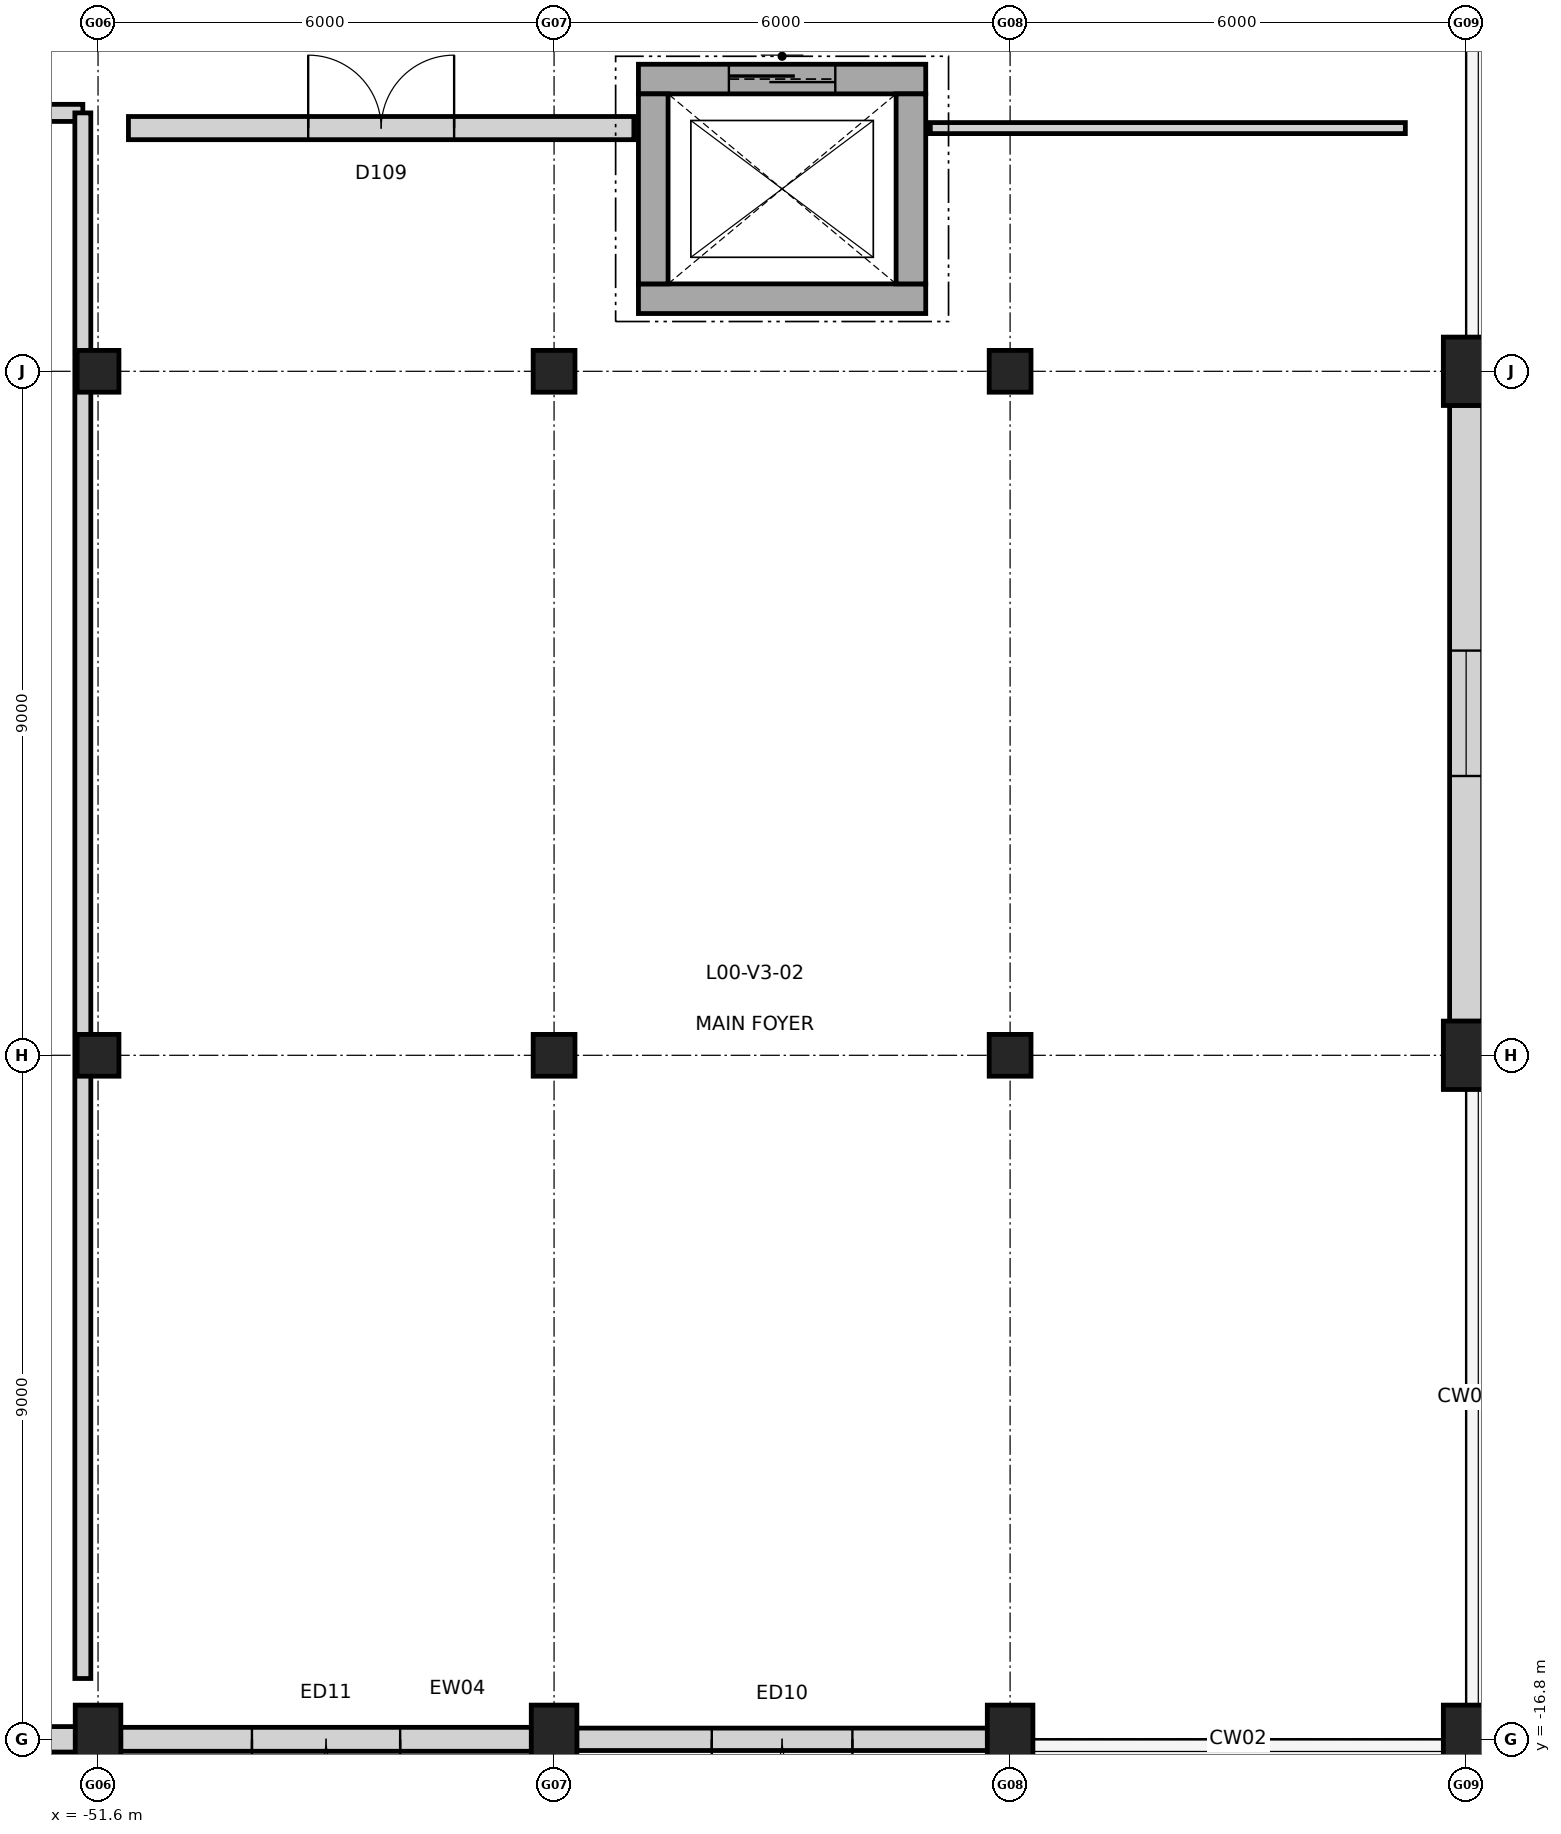
"""IFC4 building model, lengths in metres.
Left out: names, types, materials, properties, quantities, classifications, styles, units other than length and angle.
Written with IfcOpenShell. Run it as: python <this file> out.ifc"""

import sys

from ifc_helpers import new_model, si_unit, direction, frame, frame_2d, origin, origin_2d, place, context, subcontext, project, spatial, rectangle, extrude, element, fill, save


model = new_model("IFC4")
c1 = context("Model", 3, precision=1e-05, world=origin(), true_north=direction((0.0, 1.0)))
c2 = subcontext(c1, "Body", "Model", "MODEL_VIEW")
j1 = project(units=[si_unit("LENGTHUNIT", "METRE"), si_unit("PLANEANGLEUNIT", "RADIAN")], contexts=[c1])
p1 = place(None, origin())
s1 = spatial("IfcSite", under=j1, at=p1, CompositionType="ELEMENT")
p2 = place(p1, origin())
s2 = spatial("IfcBuilding", under=s1, at=p2, CompositionType="ELEMENT")
p3 = place(p2, origin())
s3 = spatial("IfcBuildingStorey", under=s2, at=p3, CompositionType="ELEMENT", Elevation=0.0)
p4 = place(p3, frame((-51.6, -16.8, 0.0), z_axis=(0.0, 0.0, 1.0), x_axis=(1.0, 0.0, 0.0)))
e1 = element("IfcColumn", 1, at=p4, inside=s3, PredefinedType="COLUMN", context=c2, shape_type="SweptSolid", body=[
    extrude(rectangle(XDim=0.6, YDim=0.9, at=origin_2d()), origin(), (0.0, 0.0, 1.0), 5.4),
])
for number, where, z_axis, x_axis in (
    (2, (-51.6, -7.8, 0.0), (0.0, 0.0, 1.0), (1.0, 0.0, 0.0)),
    (3, (-51.6, 1.2, 0.0), (0.0, 0.0, 1.0), (1.0, 0.0, 0.0)),
):
    element("IfcColumn", number, at=place(p3, frame(where, z_axis=z_axis, x_axis=x_axis)), inside=s3, PredefinedType="COLUMN", context=c2, shape_type="SweptSolid", body=[
        extrude(rectangle(XDim=0.55, YDim=0.55, at=origin_2d()), origin(), (0.0, 0.0, 1.0), 5.4),
    ])
p5 = place(p3, frame((-45.6, -16.8, 0.0), z_axis=(0.0, 0.0, 1.0), x_axis=(1.0, 0.0, 0.0)))
e4 = element("IfcColumn", 4, at=p5, inside=s3, PredefinedType="COLUMN", context=c2, shape_type="SweptSolid", body=[
    extrude(rectangle(XDim=0.6, YDim=0.9, at=origin_2d()), origin(), (0.0, 0.0, 1.0), 5.4),
])
for number, where, z_axis, x_axis in (
    (5, (-45.6, -7.8, 0.0), (0.0, 0.0, 1.0), (1.0, 0.0, 0.0)),
    (6, (-45.6, 1.2, 0.0), (0.0, 0.0, 1.0), (1.0, 0.0, 0.0)),
):
    element("IfcColumn", number, at=place(p3, frame(where, z_axis=z_axis, x_axis=x_axis)), inside=s3, PredefinedType="COLUMN", context=c2, shape_type="SweptSolid", body=[
        extrude(rectangle(XDim=0.55, YDim=0.55, at=origin_2d()), origin(), (0.0, 0.0, 1.0), 5.4),
    ])
p6 = place(p3, frame((-39.6, -16.8, 0.0), z_axis=(0.0, 0.0, 1.0), x_axis=(1.0, 0.0, 0.0)))
e7 = element("IfcColumn", 7, at=p6, inside=s3, PredefinedType="COLUMN", context=c2, shape_type="SweptSolid", body=[
    extrude(rectangle(XDim=0.6, YDim=0.9, at=origin_2d()), origin(), (0.0, 0.0, 1.0), 5.4),
])
for number, where, z_axis, x_axis in (
    (8, (-39.6, -7.8, 0.0), (0.0, 0.0, 1.0), (1.0, 0.0, 0.0)),
    (9, (-39.6, 1.2, 0.0), (0.0, 0.0, 1.0), (1.0, 0.0, 0.0)),
):
    element("IfcColumn", number, at=place(p3, frame(where, z_axis=z_axis, x_axis=x_axis)), inside=s3, PredefinedType="COLUMN", context=c2, shape_type="SweptSolid", body=[
        extrude(rectangle(XDim=0.55, YDim=0.55, at=origin_2d()), origin(), (0.0, 0.0, 1.0), 5.4),
    ])
for number, where, z_axis, x_axis in (
    (10, (-33.6, -16.8, 0.0), (0.0, 0.0, 1.0), (1.0, 0.0, 0.0)),
    (11, (-33.6, -7.8, 0.0), (0.0, 0.0, 1.0), (1.0, 0.0, 0.0)),
    (12, (-33.6, 1.2, 0.0), (0.0, 0.0, 1.0), (1.0, 0.0, 0.0)),
):
    element("IfcColumn", number, at=place(p3, frame(where, z_axis=z_axis, x_axis=x_axis)), inside=s3, PredefinedType="COLUMN", context=c2, shape_type="SweptSolid", body=[
        extrude(rectangle(XDim=0.6, YDim=0.9, at=origin_2d()), origin(), (0.0, 0.0, 1.0), 5.4),
    ])
p7 = place(p3, frame((-39.898, -16.8, 0.0), z_axis=(0.0, 0.0, 1.0), x_axis=(-1.0, 0.0, 0.0)))
e13 = element("IfcWall", 13, at=p7, inside=s3, PredefinedType="STANDARD", context=c2, shape_type="SweptSolid", body=[
    extrude(rectangle(XDim=5.404, YDim=0.295, at=frame_2d((2.702, 0.0))), origin(), (0.0, 0.0, 1.0), 4.32),
])
p8 = place(p7, frame((1.777, 0.0, 0.0)))
e14 = element("IfcOpeningElement", 14, at=p8, cuts=e13, PredefinedType="OPENING", context=c2, shape_type="SweptSolid", body=[
    extrude(rectangle(XDim=1.85, YDim=2.25, at=frame_2d((0.925, 1.125))), frame((0.0, 0.157, 0.0), z_axis=(0.0, -1.0, 0.0), x_axis=(1.0, 0.0, 0.0)), (0.0, 0.0, 1.0), 0.315),
])
p9 = place(p3, frame((-45.898, -16.8, 0.0), z_axis=(0.0, 0.0, 1.0), x_axis=(-1.0, 0.0, 0.0)))
e15 = element("IfcWall", 15, at=p9, inside=s3, PredefinedType="STANDARD", context=c2, shape_type="SweptSolid", body=[
    extrude(rectangle(XDim=5.404, YDim=0.315, at=frame_2d((2.702, 0.0))), origin(), (0.0, 0.0, 1.0), 4.32),
])
p10 = place(p9, frame((1.727, 0.0, 0.0)))
e16 = element("IfcOpeningElement", 16, at=p10, cuts=e15, PredefinedType="OPENING", context=c2, shape_type="SweptSolid", body=[
    extrude(rectangle(XDim=1.95, YDim=2.35, at=frame_2d((0.975, 1.175))), frame((0.0, 0.167, 0.0), z_axis=(0.0, -1.0, 0.0), x_axis=(1.0, 0.0, 0.0)), (0.0, 0.0, 1.0), 0.335),
])
p11 = place(p3, frame((-51.898, -16.8, 0.0), z_axis=(0.0, 0.0, 1.0), x_axis=(-1.0, 0.0, 0.0)))
e17 = element("IfcWall", 17, at=p11, inside=s3, PredefinedType="STANDARD", context=c2, shape_type="SweptSolid", body=[
    extrude(rectangle(XDim=5.404, YDim=0.335, at=frame_2d((2.702, 0.0))), origin(), (0.0, 0.0, 1.0), 4.32),
])
p12 = place(p11, frame((1.502, 0.0, 0.0)))
e18 = element("IfcOpeningElement", 18, at=p12, cuts=e17, PredefinedType="OPENING", context=c2, shape_type="SweptSolid", body=[
    extrude(rectangle(XDim=2.4, YDim=2.5, at=frame_2d((1.2, 1.25))), frame((0.0, 0.177, 0.0), z_axis=(0.0, -1.0, 0.0), x_axis=(1.0, 0.0, 0.0)), (0.0, 0.0, 1.0), 0.355),
])
p13 = place(p3, frame((-33.6, 0.752, 0.0), z_axis=(0.0, 0.0, 1.0), x_axis=(0.0, -1.0, 0.0)))
e19 = element("IfcWall", 19, at=p13, inside=s3, PredefinedType="STANDARD", context=c2, shape_type="SweptSolid", body=[
    extrude(rectangle(XDim=8.104, YDim=0.435, at=frame_2d((4.052, 0.0))), origin(), (0.0, 0.0, 1.0), 4.404),
])
p14 = place(p13, frame((3.227, 0.0, 0.85)))
e20 = element("IfcOpeningElement", 20, at=p14, cuts=e19, PredefinedType="OPENING", context=c2, shape_type="SweptSolid", body=[
    extrude(rectangle(XDim=1.65, YDim=2.1, at=frame_2d((0.825, 1.05))), frame((0.0, 0.228, 0.0), z_axis=(0.0, -1.0, 0.0), x_axis=(1.0, 0.0, 0.0)), (0.0, 0.0, 1.0), 0.455),
])
p15 = place(p3, frame((-40.71, 2.155, 0.0), z_axis=(0.0, 0.0, 1.0), x_axis=(-1.0, 0.0, 0.0)))
e21 = element("IfcWall", 21, at=p15, inside=s3, PredefinedType="SHEAR", context=c2, shape_type="SweptSolid", body=[
    extrude(rectangle(XDim=3.78, YDim=0.39, at=frame_2d((1.89, 0.0))), origin(), (0.0, 0.0, 1.0), 5.4),
])
p16 = place(p3, frame((-44.49, 5.045, 0.0), z_axis=(0.0, 0.0, 1.0), x_axis=(1.0, 0.0, 0.0)))
e22 = element("IfcWall", 22, at=p16, inside=s3, PredefinedType="SHEAR", context=c2, shape_type="SweptSolid", body=[
    extrude(rectangle(XDim=3.78, YDim=0.39, at=frame_2d((1.89, 0.0))), origin(), (0.0, 0.0, 1.0), 5.4),
])
p17 = place(p16, frame((1.19, 0.0, 0.0)))
e23 = element("IfcOpeningElement", 23, at=p17, cuts=e22, PredefinedType="OPENING", context=c2, shape_type="SweptSolid", body=[
    extrude(rectangle(XDim=1.4, YDim=2.2, at=frame_2d((0.7, 1.1))), frame((0.0, 0.205, 0.0), z_axis=(0.0, -1.0, 0.0), x_axis=(1.0, 0.0, 0.0)), (0.0, 0.0, 1.0), 0.41),
])
for number, where, z_axis, x_axis in (
    (24, (-44.295, 2.35, 0.0), (0.0, 0.0, 1.0), (0.0, 1.0, 0.0)),
    (25, (-40.905, 4.85, 0.0), (0.0, 0.0, 1.0), (0.0, -1.0, 0.0)),
):
    element("IfcWall", number, at=place(p3, frame(where, z_axis=z_axis, x_axis=x_axis)), inside=s3, PredefinedType="SHEAR", context=c2, shape_type="SweptSolid", body=[
        extrude(rectangle(XDim=2.5, YDim=0.39, at=frame_2d((1.25, 0.0))), origin(), (0.0, 0.0, 1.0), 5.4),
    ])
p18 = place(p3, frame((-74.8, 4.6, 0.0), z_axis=(0.0, 0.0, 1.0), x_axis=(1.0, 0.0, 0.0)))
e26 = element("IfcWall", 26, at=p18, inside=s3, PredefinedType="PARTITIONING", context=c2, shape_type="SweptSolid", body=[
    extrude(rectangle(XDim=23.0, YDim=0.225, at=frame_2d((11.5, 0.0))), origin(), (0.0, 0.0, 1.0), 5.02),
])
p19 = place(p18, frame((10.61, 0.0, 0.0)))
e27 = element("IfcOpeningElement", 27, at=p19, cuts=e26, PredefinedType="OPENING", context=c2, shape_type="SweptSolid", body=[
    extrude(rectangle(XDim=1.78, YDim=2.3, at=frame_2d((0.89, 1.15))), frame((0.0, 0.123, 0.0), z_axis=(0.0, -1.0, 0.0), x_axis=(1.0, 0.0, 0.0)), (0.0, 0.0, 1.0), 0.245),
])
p20 = place(p3, frame((-51.8, -16.0, 0.0), z_axis=(0.0, 0.0, 1.0), x_axis=(0.0, 1.0, 0.0)))
e28 = element("IfcWall", 28, at=p20, inside=s3, PredefinedType="PARTITIONING", context=c2, shape_type="SweptSolid", body=[
    extrude(rectangle(XDim=20.6, YDim=0.21, at=frame_2d((10.3, 0.0))), origin(), (0.0, 0.0, 1.0), 4.165),
])
p21 = place(p3, frame((-51.2, 4.4, 0.0), z_axis=(0.0, 0.0, 1.0), x_axis=(1.0, 0.0, 0.0)))
e29 = element("IfcWall", 29, at=p21, inside=s3, PredefinedType="PARTITIONING", context=c2, shape_type="SweptSolid", body=[
    extrude(rectangle(XDim=6.65, YDim=0.305, at=frame_2d((3.325, 0.0))), origin(), (0.0, 0.0, 1.0), 5.02),
])
p22 = place(p21, frame((2.365, 0.0, 0.0)))
e30 = element("IfcOpeningElement", 30, at=p22, cuts=e29, PredefinedType="OPENING", context=c2, shape_type="SweptSolid", body=[
    extrude(rectangle(XDim=1.92, YDim=2.4, at=frame_2d((0.96, 1.2))), frame((0.0, 0.162, 0.0), z_axis=(0.0, -1.0, 0.0), x_axis=(1.0, 0.0, 0.0)), (0.0, 0.0, 1.0), 0.325),
])
p23 = place(p3, frame((-40.65, 4.4, 0.0), z_axis=(0.0, 0.0, 1.0), x_axis=(1.0, 0.0, 0.0)))
e31 = element("IfcWall", 31, at=p23, inside=s3, PredefinedType="PARTITIONING", context=c2, shape_type="SweptSolid", body=[
    extrude(rectangle(XDim=6.25, YDim=0.145, at=frame_2d((3.125, 0.0))), origin(), (0.0, 0.0, 1.0), 5.02),
])
p24 = place(p8, origin())
e32 = element("IfcDoor", 32, at=p24, inside=s3, OperationType="DOUBLE_DOOR_SINGLE_SWING", PredefinedType="DOOR", context=c2, shape_type="SweptSolid", body=[
    extrude(rectangle(XDim=1.85, YDim=2.25, at=frame_2d((0.925, 1.125))), frame((0.0, 0.025, 0.0), z_axis=(0.0, -1.0, 0.0), x_axis=(1.0, 0.0, 0.0)), (0.0, 0.0, 1.0), 0.05),
])
fill(e14, e32)
p25 = place(p10, origin())
e33 = element("IfcDoor", 33, at=p25, inside=s3, OperationType="DOUBLE_DOOR_SINGLE_SWING", PredefinedType="DOOR", context=c2, shape_type="SweptSolid", body=[
    extrude(rectangle(XDim=1.95, YDim=2.35, at=frame_2d((0.975, 1.175))), frame((0.0, 0.025, 0.0), z_axis=(0.0, -1.0, 0.0), x_axis=(1.0, 0.0, 0.0)), (0.0, 0.0, 1.0), 0.05),
])
fill(e16, e33)
p26 = place(p14, origin())
e34 = element("IfcWindow", 34, at=p26, inside=s3, PartitioningType="SINGLE_PANEL", PredefinedType="WINDOW", context=c2, shape_type="SweptSolid", body=[
    extrude(rectangle(XDim=1.65, YDim=2.1, at=frame_2d((0.825, 1.05))), frame((0.0, 0.03, 0.0), z_axis=(0.0, -1.0, 0.0), x_axis=(1.0, 0.0, 0.0)), (0.0, 0.0, 1.0), 0.06),
])
fill(e20, e34)
p27 = place(p17, origin())
e35 = element("IfcDoor", 35, at=p27, inside=s3, OperationType="SLIDING_TO_LEFT", PredefinedType="DOOR", context=c2, shape_type="SweptSolid", body=[
    extrude(rectangle(XDim=1.4, YDim=2.2, at=frame_2d((0.7, 1.1))), frame((0.0, 0.025, 0.0), z_axis=(0.0, -1.0, 0.0), x_axis=(1.0, 0.0, 0.0)), (0.0, 0.0, 1.0), 0.05),
])
fill(e23, e35)
p28 = place(p22, origin())
e36 = element("IfcDoor", 36, at=p28, inside=s3, OperationType="DOUBLE_DOOR_SINGLE_SWING", PredefinedType="DOOR", context=c2, shape_type="SweptSolid", body=[
    extrude(rectangle(XDim=1.92, YDim=2.4, at=frame_2d((0.96, 1.2))), frame((0.0, 0.025, 0.0), z_axis=(0.0, -1.0, 0.0), x_axis=(1.0, 0.0, 0.0)), (0.0, 0.0, 1.0), 0.05),
])
fill(e30, e36)
save(model, sys.argv[1])
